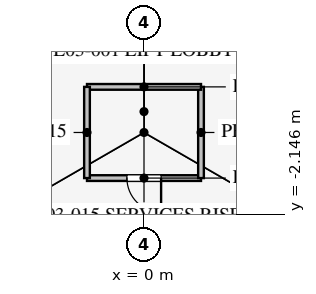
"""IFC4 building model, lengths in metres.
Left out: names, types, materials, properties, quantities, classifications, styles, units other than length and angle.
Written with IfcOpenShell. Run it as: python <this file> out.ifc"""

import sys

from ifc_helpers import new_model, si_unit, direction, frame, frame_2d, origin, place, context, subcontext, project, spatial, rectangle, extrude, element, fill, save


model = new_model("IFC4")
c1 = context("Model", 3, precision=1e-05, world=origin(), true_north=direction((0.0, 1.0)))
c2 = subcontext(c1, "Body", "Model", "MODEL_VIEW")
j1 = project(units=[si_unit("LENGTHUNIT", "METRE"), si_unit("PLANEANGLEUNIT", "RADIAN")], contexts=[c1])
p1 = place(None, origin())
s1 = spatial("IfcSite", under=j1, at=p1, CompositionType="ELEMENT")
p2 = place(p1, origin())
s2 = spatial("IfcBuilding", under=s1, at=p2, CompositionType="ELEMENT")
p3 = place(p2, frame((0.0, 0.0, 16.5)))
s3 = spatial("IfcBuildingStorey", under=s2, at=p3, CompositionType="ELEMENT", Elevation=16.5)
p4 = place(p3, frame((-1.5, -1.2, 0.0), z_axis=(0.0, 0.0, 1.0), x_axis=(1.0, 0.0, 0.0)))
e1 = element("IfcWall", 1, at=p4, inside=s3, PredefinedType="PARTITIONING", context=c2, shape_type="SweptSolid", body=[
    extrude(rectangle(XDim=3.0, YDim=0.15, at=frame_2d((1.5, 0.0))), origin(), (0.0, 0.0, 1.0), 4.0),
])
p5 = place(p4, frame((1.05, 0.0, 0.0)))
e2 = element("IfcOpeningElement", 2, at=p5, cuts=e1, PredefinedType="OPENING", context=c2, shape_type="SweptSolid", body=[
    extrude(rectangle(XDim=0.9, YDim=2.1, at=frame_2d((0.45, 1.05))), frame((0.0, 0.085, 0.0), z_axis=(0.0, -1.0, 0.0), x_axis=(1.0, 0.0, 0.0)), (0.0, 0.0, 1.0), 0.17),
])
p6 = place(p3, frame((1.5, -1.2, 0.0), z_axis=(0.0, 0.0, 1.0), x_axis=(0.0, 1.0, 0.0)))
e3 = element("IfcWall", 3, at=p6, inside=s3, PredefinedType="PARTITIONING", context=c2, shape_type="SweptSolid", body=[
    extrude(rectangle(XDim=2.4, YDim=0.15, at=frame_2d((1.2, 0.0))), origin(), (0.0, 0.0, 1.0), 4.0),
])
p7 = place(p3, frame((1.5, 1.2, 0.0), z_axis=(0.0, 0.0, 1.0), x_axis=(-1.0, 0.0, 0.0)))
e4 = element("IfcWall", 4, at=p7, inside=s3, PredefinedType="PARTITIONING", context=c2, shape_type="SweptSolid", body=[
    extrude(rectangle(XDim=3.0, YDim=0.15, at=frame_2d((1.5, 0.0))), origin(), (0.0, 0.0, 1.0), 4.0),
])
p8 = place(p3, frame((-1.5, 1.2, 0.0), z_axis=(0.0, 0.0, 1.0), x_axis=(0.0, -1.0, 0.0)))
e5 = element("IfcWall", 5, at=p8, inside=s3, PredefinedType="PARTITIONING", context=c2, shape_type="SweptSolid", body=[
    extrude(rectangle(XDim=2.4, YDim=0.15, at=frame_2d((1.2, 0.0))), origin(), (0.0, 0.0, 1.0), 4.0),
])
p9 = place(p5, frame((0.9, 0.0, 0.0), z_axis=(0.0, 0.0, 1.0), x_axis=(-1.0, 0.0, 0.0)))
e6 = element("IfcDoor", 6, at=p9, inside=s3, OperationType="SINGLE_SWING_LEFT", PredefinedType="DOOR", context=c2, shape_type="SweptSolid", body=[
    extrude(rectangle(XDim=0.9, YDim=2.1, at=frame_2d((0.45, 1.05))), frame((0.0, 0.025, 0.0), z_axis=(0.0, -1.0, 0.0), x_axis=(1.0, 0.0, 0.0)), (0.0, 0.0, 1.0), 0.05),
])
fill(e2, e6)
save(model, sys.argv[1])
